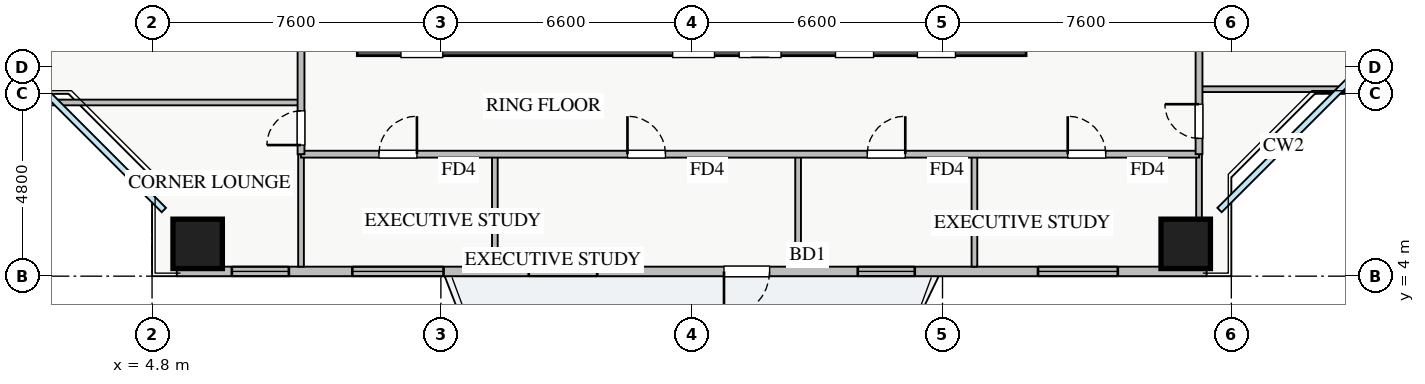
"""IFC4 building model, lengths in metres.
Left out: names, types, materials, properties, quantities, classifications, styles, units other than length and angle.
Written with IfcOpenShell. Run it as: python <this file> out.ifc"""

import sys

from ifc_helpers import new_model, si_unit, direction, frame, frame_2d, origin, origin_2d, place, context, subcontext, project, spatial, rectangle, extrude, source, transform, mapped, element, fill, save


model = new_model("IFC4")
c1 = context("Model", 3, precision=1e-05, world=origin(), true_north=direction((0.0, 1.0)))
c2 = subcontext(c1, "Body", "Model", "MODEL_VIEW")
j1 = project(units=[si_unit("LENGTHUNIT", "METRE"), si_unit("PLANEANGLEUNIT", "RADIAN")], contexts=[c1])
p1 = place(None, origin())
s1 = spatial("IfcSite", under=j1, at=p1, CompositionType="ELEMENT")
p2 = place(p1, origin())
s2 = spatial("IfcBuilding", under=s1, at=p2, CompositionType="ELEMENT")
p3 = place(p2, frame((0.0, 0.0, 39.25)))
s3 = spatial("IfcBuildingStorey", under=s2, at=p3, CompositionType="ELEMENT", Elevation=39.25)
p4 = place(p3, frame((10.2, 10.2, 0.0), z_axis=(0.0, 0.0, 1.0), x_axis=(1.0, 0.0, 0.0)))
e1 = element("IfcWall", 1, at=p4, inside=s3, PredefinedType="SHEAR", context=c2, shape_type="SweptSolid", body=[
    extrude(rectangle(XDim=17.6, YDim=0.8, at=frame_2d((8.8, 0.0))), origin(), (0.0, 0.0, 1.0), 3.25),
])
p5 = place(p4, frame((1.15, 0.0, 0.0)))
e2 = element("IfcOpeningElement", 2, at=p5, cuts=e1, PredefinedType="OPENING", context=c2, shape_type="SweptSolid", body=[
    extrude(rectangle(XDim=1.1, YDim=2.05, at=frame_2d((0.55, 1.025))), frame((0.0, 0.41, 0.0), z_axis=(0.0, -1.0, 0.0), x_axis=(1.0, 0.0, 0.0)), (0.0, 0.0, 1.0), 0.82),
])
p6 = place(p4, frame((8.3, 0.0, 0.0)))
e3 = element("IfcOpeningElement", 3, at=p6, cuts=e1, PredefinedType="OPENING", context=c2, shape_type="SweptSolid", body=[
    extrude(rectangle(XDim=1.1, YDim=2.05, at=frame_2d((0.55, 1.025))), frame((0.0, 0.41, 0.0), z_axis=(0.0, -1.0, 0.0), x_axis=(1.0, 0.0, 0.0)), (0.0, 0.0, 1.0), 0.82),
])
p7 = place(p4, frame((10.05, 0.0, 0.0)))
e4 = element("IfcOpeningElement", 4, at=p7, cuts=e1, PredefinedType="OPENING", context=c2, shape_type="SweptSolid", body=[
    extrude(rectangle(XDim=1.1, YDim=2.05, at=frame_2d((0.55, 1.025))), frame((0.0, 0.41, 0.0), z_axis=(0.0, -1.0, 0.0), x_axis=(1.0, 0.0, 0.0)), (0.0, 0.0, 1.0), 0.82),
])
p8 = place(p4, frame((14.74, 0.0, 0.0)))
e5 = element("IfcOpeningElement", 5, at=p8, cuts=e1, PredefinedType="OPENING", context=c2, shape_type="SweptSolid", body=[
    extrude(rectangle(XDim=1.0, YDim=2.05, at=frame_2d((0.5, 1.025))), frame((0.0, 0.41, 0.0), z_axis=(0.0, -1.0, 0.0), x_axis=(1.0, 0.0, 0.0)), (0.0, 0.0, 1.0), 0.82),
])
p9 = place(p4, frame((12.585, 0.0, 0.0)))
e6 = element("IfcOpeningElement", 6, at=p9, cuts=e1, PredefinedType="OPENING", context=c2, shape_type="SweptSolid", body=[
    extrude(rectangle(XDim=1.0, YDim=2.05, at=frame_2d((0.5, 1.025))), frame((0.0, 0.41, 0.0), z_axis=(0.0, -1.0, 0.0), x_axis=(1.0, 0.0, 0.0)), (0.0, 0.0, 1.0), 0.82),
])
m1 = source(origin(), c2, "Body", "SweptSolid", [
    extrude(rectangle(XDim=1.3, YDim=1.3, at=origin_2d()), origin(), (0.0, 0.0, 1.0), 3.25),
])
for number, where, z_axis, x_axis in (
    (7, (6.0, 4.85, 0.0), (0.0, 0.0, 1.0), (1.0, 0.0, 0.0)),
    (8, (32.0, 4.85, 0.0), (0.0, 0.0, 1.0), (1.0, 0.0, 0.0)),
):
    element("IfcColumn", number, at=place(p3, frame(where, z_axis=z_axis, x_axis=x_axis)), inside=s3, PredefinedType="COLUMN", context=c2, shape_type="MappedRepresentation", body=[
        mapped(m1, transform((0.0, 0.0, 0.0), x_axis=(1.0, 0.0, 0.0), y_axis=(0.0, 1.0, 0.0), z_axis=(0.0, 0.0, 1.0), scale=1.0)),
    ])
p10 = place(p3, frame((5.45, 4.125, 0.0), z_axis=(0.0, 0.0, 1.0), x_axis=(1.0, 0.0, 0.0)))
e9 = element("IfcWall", 9, at=p10, inside=s3, PredefinedType="STANDARD", context=c2, shape_type="SweptSolid", body=[
    extrude(rectangle(XDim=27.1, YDim=0.25, at=frame_2d((13.55, 0.0))), origin(), (0.0, 0.0, 1.0), 2.61),
])
p11 = place(p10, frame((14.4, 0.0, 0.0)))
e10 = element("IfcOpeningElement", 10, at=p11, cuts=e9, PredefinedType="OPENING", context=c2, shape_type="SweptSolid", body=[
    extrude(rectangle(XDim=1.2, YDim=2.1, at=frame_2d((0.6, 1.05))), frame((0.0, 0.135, 0.0), z_axis=(0.0, -1.0, 0.0), x_axis=(1.0, 0.0, 0.0)), (0.0, 0.0, 1.0), 0.27),
])
p12 = place(p10, frame((1.45, 0.0, 0.9)))
e11 = element("IfcOpeningElement", 11, at=p12, cuts=e9, PredefinedType="OPENING", context=c2, shape_type="SweptSolid", body=[
    extrude(rectangle(XDim=1.5, YDim=1.5, at=frame_2d((0.75, 0.75))), frame((0.0, 0.135, 0.0), z_axis=(0.0, -1.0, 0.0), x_axis=(1.0, 0.0, 0.0)), (0.0, 0.0, 1.0), 0.27),
])
p13 = place(p10, frame((9.263, 0.0, 0.9)))
e12 = element("IfcOpeningElement", 12, at=p13, cuts=e9, PredefinedType="OPENING", context=c2, shape_type="SweptSolid", body=[
    extrude(rectangle(XDim=1.8, YDim=1.45, at=frame_2d((0.9, 0.725))), frame((0.0, 0.135, 0.0), z_axis=(0.0, -1.0, 0.0), x_axis=(1.0, 0.0, 0.0)), (0.0, 0.0, 1.0), 0.27),
])
p14 = place(p10, frame((17.92, 0.0, 0.9)))
e13 = element("IfcOpeningElement", 13, at=p14, cuts=e9, PredefinedType="OPENING", context=c2, shape_type="SweptSolid", body=[
    extrude(rectangle(XDim=1.5, YDim=1.5, at=frame_2d((0.75, 0.75))), frame((0.0, 0.135, 0.0), z_axis=(0.0, -1.0, 0.0), x_axis=(1.0, 0.0, 0.0)), (0.0, 0.0, 1.0), 0.27),
])
p15 = place(p10, frame((22.663, 0.0, 0.9)))
e14 = element("IfcOpeningElement", 14, at=p15, cuts=e9, PredefinedType="OPENING", context=c2, shape_type="SweptSolid", body=[
    extrude(rectangle(XDim=2.1, YDim=1.48, at=frame_2d((1.05, 0.74))), frame((0.0, 0.135, 0.0), z_axis=(0.0, -1.0, 0.0), x_axis=(1.0, 0.0, 0.0)), (0.0, 0.0, 1.0), 0.27),
])
p16 = place(p10, frame((4.62, 0.0, 0.9)))
e15 = element("IfcOpeningElement", 15, at=p16, cuts=e9, PredefinedType="OPENING", context=c2, shape_type="SweptSolid", body=[
    extrude(rectangle(XDim=2.4, YDim=1.5, at=frame_2d((1.2, 0.75))), frame((0.0, 0.135, 0.0), z_axis=(0.0, -1.0, 0.0), x_axis=(1.0, 0.0, 0.0)), (0.0, 0.0, 1.0), 0.27),
])
for number, where, z_axis, x_axis in (
    (16, (13.82, 4.25, 0.0), (0.0, 0.0, 1.0), (0.0, 1.0, 0.0)),
    (17, (21.8, 4.25, 0.0), (0.0, 0.0, 1.0), (0.0, 1.0, 0.0)),
    (18, (26.44, 4.25, 0.0), (0.0, 0.0, 1.0), (0.0, 1.0, 0.0)),
    (19, (8.72, 4.25, 0.0), (0.0, 0.0, 1.0), (0.0, 1.0, 0.0)),
    (20, (32.35, 4.25, 0.0), (0.0, 0.0, 1.0), (0.0, 1.0, 0.0)),
):
    element("IfcWall", number, at=place(p3, frame(where, z_axis=z_axis, x_axis=x_axis)), inside=s3, PredefinedType="PARTITIONING", context=c2, shape_type="SweptSolid", body=[
        extrude(rectangle(XDim=2.96, YDim=0.15, at=frame_2d((1.48, 0.0))), origin(), (0.0, 0.0, 1.0), 3.07),
    ])
p17 = place(p3, frame((8.72, 7.21, 0.0), z_axis=(0.0, 0.0, 1.0), x_axis=(1.0, 0.0, 0.0)))
e21 = element("IfcWall", 21, at=p17, inside=s3, PredefinedType="PARTITIONING", context=c2, shape_type="SweptSolid", body=[
    extrude(rectangle(XDim=23.63, YDim=0.18, at=frame_2d((11.815, 0.0))), origin(), (0.0, 0.0, 1.0), 3.07),
])
p18 = place(p17, frame((2.05, 0.0, 0.0)))
e22 = element("IfcOpeningElement", 22, at=p18, cuts=e21, PredefinedType="OPENING", context=c2, shape_type="SweptSolid", body=[
    extrude(rectangle(XDim=1.0, YDim=2.05, at=frame_2d((0.5, 1.025))), frame((0.0, 0.1, 0.0), z_axis=(0.0, -1.0, 0.0), x_axis=(1.0, 0.0, 0.0)), (0.0, 0.0, 1.0), 0.2),
])
p19 = place(p17, frame((8.59, 0.0, 0.0)))
e23 = element("IfcOpeningElement", 23, at=p19, cuts=e21, PredefinedType="OPENING", context=c2, shape_type="SweptSolid", body=[
    extrude(rectangle(XDim=1.0, YDim=2.05, at=frame_2d((0.5, 1.025))), frame((0.0, 0.1, 0.0), z_axis=(0.0, -1.0, 0.0), x_axis=(1.0, 0.0, 0.0)), (0.0, 0.0, 1.0), 0.2),
])
p20 = place(p17, frame((14.9, 0.0, 0.0)))
e24 = element("IfcOpeningElement", 24, at=p20, cuts=e21, PredefinedType="OPENING", context=c2, shape_type="SweptSolid", body=[
    extrude(rectangle(XDim=1.0, YDim=2.05, at=frame_2d((0.5, 1.025))), frame((0.0, 0.1, 0.0), z_axis=(0.0, -1.0, 0.0), x_axis=(1.0, 0.0, 0.0)), (0.0, 0.0, 1.0), 0.2),
])
p21 = place(p17, frame((20.175, 0.0, 0.0)))
e25 = element("IfcOpeningElement", 25, at=p21, cuts=e21, PredefinedType="OPENING", context=c2, shape_type="SweptSolid", body=[
    extrude(rectangle(XDim=1.0, YDim=2.05, at=frame_2d((0.5, 1.025))), frame((0.0, 0.1, 0.0), z_axis=(0.0, -1.0, 0.0), x_axis=(1.0, 0.0, 0.0)), (0.0, 0.0, 1.0), 0.2),
])
p22 = place(p3, frame((0.25, 8.57, 0.0), z_axis=(0.0, 0.0, 1.0), x_axis=(1.0, 0.0, 0.0)))
e26 = element("IfcWall", 26, at=p22, inside=s3, PredefinedType="PARTITIONING", context=c2, shape_type="SweptSolid", body=[
    extrude(rectangle(XDim=8.47, YDim=0.15, at=frame_2d((4.235, 0.0))), origin(), (0.0, 0.0, 1.0), 3.07),
])
p23 = place(p3, frame((8.72, 7.21, 0.0), z_axis=(0.0, 0.0, 1.0), x_axis=(0.0, 1.0, 0.0)))
e27 = element("IfcWall", 27, at=p23, inside=s3, PredefinedType="PARTITIONING", context=c2, shape_type="SweptSolid", body=[
    extrude(rectangle(XDim=31.23, YDim=0.18, at=frame_2d((15.615, 0.0))), origin(), (0.0, 0.0, 1.0), 3.07),
])
p24 = place(p23, frame((30.09, 0.0, 0.0)))
e28 = element("IfcOpeningElement", 28, at=p24, cuts=e27, PredefinedType="OPENING", context=c2, shape_type="SweptSolid", body=[
    extrude(rectangle(XDim=0.9, YDim=2.05, at=frame_2d((0.45, 1.025))), frame((0.0, 0.1, 0.0), z_axis=(0.0, -1.0, 0.0), x_axis=(1.0, 0.0, 0.0)), (0.0, 0.0, 1.0), 0.2),
])
p25 = place(p23, frame((0.24, 0.0, 0.0)))
e29 = element("IfcOpeningElement", 29, at=p25, cuts=e27, PredefinedType="OPENING", context=c2, shape_type="SweptSolid", body=[
    extrude(rectangle(XDim=0.9, YDim=2.05, at=frame_2d((0.45, 1.025))), frame((0.0, 0.1, 0.0), z_axis=(0.0, -1.0, 0.0), x_axis=(1.0, 0.0, 0.0)), (0.0, 0.0, 1.0), 0.2),
])
p26 = place(p23, frame((5.265, 0.0, 0.0)))
e30 = element("IfcOpeningElement", 30, at=p26, cuts=e27, PredefinedType="OPENING", context=c2, shape_type="SweptSolid", body=[
    extrude(rectangle(XDim=1.0, YDim=2.05, at=frame_2d((0.5, 1.025))), frame((0.0, 0.1, 0.0), z_axis=(0.0, -1.0, 0.0), x_axis=(1.0, 0.0, 0.0)), (0.0, 0.0, 1.0), 0.2),
])
p27 = place(p23, frame((11.93, 0.0, 0.0)))
e31 = element("IfcOpeningElement", 31, at=p27, cuts=e27, PredefinedType="OPENING", context=c2, shape_type="SweptSolid", body=[
    extrude(rectangle(XDim=1.0, YDim=2.05, at=frame_2d((0.5, 1.025))), frame((0.0, 0.1, 0.0), z_axis=(0.0, -1.0, 0.0), x_axis=(1.0, 0.0, 0.0)), (0.0, 0.0, 1.0), 0.2),
])
p28 = place(p23, frame((21.96, 0.0, 0.0)))
e32 = element("IfcOpeningElement", 32, at=p28, cuts=e27, PredefinedType="OPENING", context=c2, shape_type="SweptSolid", body=[
    extrude(rectangle(XDim=1.0, YDim=2.05, at=frame_2d((0.5, 1.025))), frame((0.0, 0.1, 0.0), z_axis=(0.0, -1.0, 0.0), x_axis=(1.0, 0.0, 0.0)), (0.0, 0.0, 1.0), 0.2),
])
p29 = place(p3, frame((32.35, 8.92, 0.0), z_axis=(0.0, 0.0, 1.0), x_axis=(1.0, 0.0, 0.0)))
e33 = element("IfcWall", 33, at=p29, inside=s3, PredefinedType="PARTITIONING", context=c2, shape_type="SweptSolid", body=[
    extrude(rectangle(XDim=5.4, YDim=0.15, at=frame_2d((2.7, 0.0))), origin(), (0.0, 0.0, 1.0), 3.07),
])
p30 = place(p3, frame((32.35, 7.21, 0.0), z_axis=(0.0, 0.0, 1.0), x_axis=(0.0, 1.0, 0.0)))
e34 = element("IfcWall", 34, at=p30, inside=s3, PredefinedType="PARTITIONING", context=c2, shape_type="SweptSolid", body=[
    extrude(rectangle(XDim=31.23, YDim=0.18, at=frame_2d((15.615, 0.0))), origin(), (0.0, 0.0, 1.0), 2.821),
])
p31 = place(p30, frame((30.09, 0.0, 0.0)))
e35 = element("IfcOpeningElement", 35, at=p31, cuts=e34, PredefinedType="OPENING", context=c2, shape_type="SweptSolid", body=[
    extrude(rectangle(XDim=0.9, YDim=2.05, at=frame_2d((0.45, 1.025))), frame((0.0, 0.1, 0.0), z_axis=(0.0, -1.0, 0.0), x_axis=(1.0, 0.0, 0.0)), (0.0, 0.0, 1.0), 0.2),
])
p32 = place(p30, frame((0.415, 0.0, 0.0)))
e36 = element("IfcOpeningElement", 36, at=p32, cuts=e34, PredefinedType="OPENING", context=c2, shape_type="SweptSolid", body=[
    extrude(rectangle(XDim=0.9, YDim=2.05, at=frame_2d((0.45, 1.025))), frame((0.0, 0.1, 0.0), z_axis=(0.0, -1.0, 0.0), x_axis=(1.0, 0.0, 0.0)), (0.0, 0.0, 1.0), 0.2),
])
p33 = place(p30, frame((6.305, 0.0, 0.0)))
e37 = element("IfcOpeningElement", 37, at=p33, cuts=e34, PredefinedType="OPENING", context=c2, shape_type="SweptSolid", body=[
    extrude(rectangle(XDim=1.0, YDim=2.05, at=frame_2d((0.5, 1.025))), frame((0.0, 0.1, 0.0), z_axis=(0.0, -1.0, 0.0), x_axis=(1.0, 0.0, 0.0)), (0.0, 0.0, 1.0), 0.2),
])
p34 = place(p30, frame((13.205, 0.0, 0.0)))
e38 = element("IfcOpeningElement", 38, at=p34, cuts=e34, PredefinedType="OPENING", context=c2, shape_type="SweptSolid", body=[
    extrude(rectangle(XDim=1.0, YDim=2.05, at=frame_2d((0.5, 1.025))), frame((0.0, 0.1, 0.0), z_axis=(0.0, -1.0, 0.0), x_axis=(1.0, 0.0, 0.0)), (0.0, 0.0, 1.0), 0.2),
])
p35 = place(p30, frame((22.5, 0.0, 0.0)))
e39 = element("IfcOpeningElement", 39, at=p35, cuts=e34, PredefinedType="OPENING", context=c2, shape_type="SweptSolid", body=[
    extrude(rectangle(XDim=1.0, YDim=2.05, at=frame_2d((0.5, 1.025))), frame((0.0, 0.1, 0.0), z_axis=(0.0, -1.0, 0.0), x_axis=(1.0, 0.0, 0.0)), (0.0, 0.0, 1.0), 0.2),
])
m2 = source(origin(), c2, "Body", "SweptSolid", [
    extrude(rectangle(XDim=1.2, YDim=2.1, at=frame_2d((0.6, 1.05))), frame((0.0, 0.025, 0.0), z_axis=(0.0, -1.0, 0.0), x_axis=(1.0, 0.0, 0.0)), (0.0, 0.0, 1.0), 0.05),
])
p36 = place(p11, frame((1.2, 0.0, 0.0), z_axis=(0.0, 0.0, 1.0), x_axis=(-1.0, 0.0, 0.0)))
e40 = element("IfcDoor", 40, at=p36, inside=s3, OperationType="SINGLE_SWING_LEFT", PredefinedType="DOOR", context=c2, shape_type="MappedRepresentation", body=[
    mapped(m2, transform((0.0, 0.0, 0.0), x_axis=(1.0, 0.0, 0.0), y_axis=(0.0, 1.0, 0.0), z_axis=(0.0, 0.0, 1.0), scale=1.0)),
])
fill(e10, e40)
m3 = source(origin(), c2, "Body", "SweptSolid", [
    extrude(rectangle(XDim=1.5, YDim=1.5, at=frame_2d((0.75, 0.75))), frame((0.0, 0.03, 0.0), z_axis=(0.0, -1.0, 0.0), x_axis=(1.0, 0.0, 0.0)), (0.0, 0.0, 1.0), 0.06),
])
p37 = place(p12, origin())
e41 = element("IfcWindow", 41, at=p37, inside=s3, PartitioningType="TRIPLE_PANEL_VERTICAL", PredefinedType="WINDOW", context=c2, shape_type="MappedRepresentation", body=[
    mapped(m3, transform((0.0, 0.0, 0.0), x_axis=(1.0, 0.0, 0.0), y_axis=(0.0, 1.0, 0.0), z_axis=(0.0, 0.0, 1.0), scale=1.0)),
])
fill(e11, e41)
m4 = source(origin(), c2, "Body", "SweptSolid", [
    extrude(rectangle(XDim=1.8, YDim=1.45, at=frame_2d((0.9, 0.725))), frame((0.0, 0.03, 0.0), z_axis=(0.0, -1.0, 0.0), x_axis=(1.0, 0.0, 0.0)), (0.0, 0.0, 1.0), 0.06),
])
p38 = place(p13, origin())
e42 = element("IfcWindow", 42, at=p38, inside=s3, PartitioningType="DOUBLE_PANEL_VERTICAL", PredefinedType="WINDOW", context=c2, shape_type="MappedRepresentation", body=[
    mapped(m4, transform((0.0, 0.0, 0.0), x_axis=(1.0, 0.0, 0.0), y_axis=(0.0, 1.0, 0.0), z_axis=(0.0, 0.0, 1.0), scale=1.0)),
])
fill(e12, e42)
p39 = place(p14, origin())
e43 = element("IfcWindow", 43, at=p39, inside=s3, PartitioningType="DOUBLE_PANEL_VERTICAL", PredefinedType="WINDOW", context=c2, shape_type="MappedRepresentation", body=[
    mapped(m3, transform((0.0, 0.0, 0.0), x_axis=(1.0, 0.0, 0.0), y_axis=(0.0, 1.0, 0.0), z_axis=(0.0, 0.0, 1.0), scale=1.0)),
])
fill(e13, e43)
m5 = source(origin(), c2, "Body", "SweptSolid", [
    extrude(rectangle(XDim=2.1, YDim=1.48, at=frame_2d((1.05, 0.74))), frame((0.0, 0.03, 0.0), z_axis=(0.0, -1.0, 0.0), x_axis=(1.0, 0.0, 0.0)), (0.0, 0.0, 1.0), 0.06),
])
p40 = place(p15, origin())
e44 = element("IfcWindow", 44, at=p40, inside=s3, PartitioningType="TRIPLE_PANEL_VERTICAL", PredefinedType="WINDOW", context=c2, shape_type="MappedRepresentation", body=[
    mapped(m5, transform((0.0, 0.0, 0.0), x_axis=(1.0, 0.0, 0.0), y_axis=(0.0, 1.0, 0.0), z_axis=(0.0, 0.0, 1.0), scale=1.0)),
])
fill(e14, e44)
m6 = source(origin(), c2, "Body", "SweptSolid", [
    extrude(rectangle(XDim=1.0, YDim=2.05, at=frame_2d((0.5, 1.025))), frame((0.0, 0.025, 0.0), z_axis=(0.0, -1.0, 0.0), x_axis=(1.0, 0.0, 0.0)), (0.0, 0.0, 1.0), 0.05),
])
p41 = place(p18, origin())
e45 = element("IfcDoor", 45, at=p41, inside=s3, OperationType="SINGLE_SWING_RIGHT", PredefinedType="DOOR", context=c2, shape_type="MappedRepresentation", body=[
    mapped(m6, transform((0.0, 0.0, 0.0), x_axis=(1.0, 0.0, 0.0), y_axis=(0.0, 1.0, 0.0), z_axis=(0.0, 0.0, 1.0), scale=1.0)),
])
fill(e22, e45)
p42 = place(p19, origin())
e46 = element("IfcDoor", 46, at=p42, inside=s3, OperationType="SINGLE_SWING_LEFT", PredefinedType="DOOR", context=c2, shape_type="MappedRepresentation", body=[
    mapped(m6, transform((0.0, 0.0, 0.0), x_axis=(1.0, 0.0, 0.0), y_axis=(0.0, 1.0, 0.0), z_axis=(0.0, 0.0, 1.0), scale=1.0)),
])
fill(e23, e46)
p43 = place(p20, origin())
e47 = element("IfcDoor", 47, at=p43, inside=s3, OperationType="SINGLE_SWING_RIGHT", PredefinedType="DOOR", context=c2, shape_type="MappedRepresentation", body=[
    mapped(m6, transform((0.0, 0.0, 0.0), x_axis=(1.0, 0.0, 0.0), y_axis=(0.0, 1.0, 0.0), z_axis=(0.0, 0.0, 1.0), scale=1.0)),
])
fill(e24, e47)
p44 = place(p21, origin())
e48 = element("IfcDoor", 48, at=p44, inside=s3, OperationType="SINGLE_SWING_LEFT", PredefinedType="DOOR", context=c2, shape_type="MappedRepresentation", body=[
    mapped(m6, transform((0.0, 0.0, 0.0), x_axis=(1.0, 0.0, 0.0), y_axis=(0.0, 1.0, 0.0), z_axis=(0.0, 0.0, 1.0), scale=1.0)),
])
fill(e25, e48)
m7 = source(origin(), c2, "Body", "SweptSolid", [
    extrude(rectangle(XDim=0.9, YDim=2.05, at=frame_2d((0.45, 1.025))), frame((0.0, 0.025, 0.0), z_axis=(0.0, -1.0, 0.0), x_axis=(1.0, 0.0, 0.0)), (0.0, 0.0, 1.0), 0.05),
])
p45 = place(p25, origin())
e49 = element("IfcDoor", 49, at=p45, inside=s3, OperationType="SINGLE_SWING_LEFT", PredefinedType="DOOR", context=c2, shape_type="MappedRepresentation", body=[
    mapped(m7, transform((0.0, 0.0, 0.0), x_axis=(1.0, 0.0, 0.0), y_axis=(0.0, 1.0, 0.0), z_axis=(0.0, 0.0, 1.0), scale=1.0)),
])
fill(e29, e49)
p46 = place(p32, origin())
e50 = element("IfcDoor", 50, at=p46, inside=s3, OperationType="SINGLE_SWING_RIGHT", PredefinedType="DOOR", context=c2, shape_type="MappedRepresentation", body=[
    mapped(m7, transform((0.0, 0.0, 0.0), x_axis=(1.0, 0.0, 0.0), y_axis=(0.0, 1.0, 0.0), z_axis=(0.0, 0.0, 1.0), scale=1.0)),
])
fill(e36, e50)
m8 = source(origin(), c2, "Body", "SweptSolid", [
    extrude(rectangle(XDim=2.4, YDim=1.5, at=frame_2d((1.2, 0.75))), frame((0.0, 0.03, 0.0), z_axis=(0.0, -1.0, 0.0), x_axis=(1.0, 0.0, 0.0)), (0.0, 0.0, 1.0), 0.06),
])
p47 = place(p16, origin())
e51 = element("IfcWindow", 51, at=p47, inside=s3, PartitioningType="TRIPLE_PANEL_VERTICAL", PredefinedType="WINDOW", context=c2, shape_type="MappedRepresentation", body=[
    mapped(m8, transform((0.0, 0.0, 0.0), x_axis=(1.0, 0.0, 0.0), y_axis=(0.0, 1.0, 0.0), z_axis=(0.0, 0.0, 1.0), scale=1.0)),
])
fill(e15, e51)
save(model, sys.argv[1])
